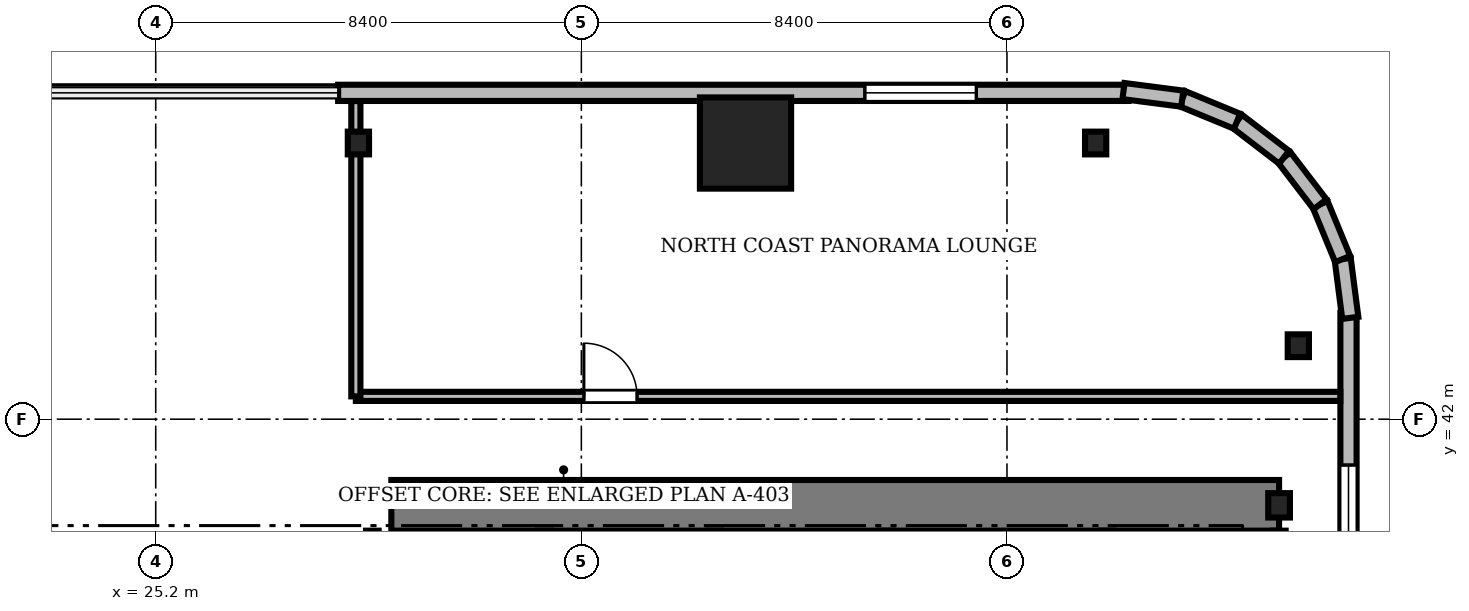
"""IFC4 building model, lengths in metres.
Left out: names, types, materials, properties, quantities, classifications, styles, units other than length and angle.
Written with IfcOpenShell. Run it as: python <this file> out.ifc"""

import sys

from ifc_helpers import new_model, si_unit, direction, frame, frame_2d, origin, origin_2d, place, context, subcontext, project, spatial, rectangle, i_section, extrude, source, transform, mapped, element, fill, save


model = new_model("IFC4")
c1 = context("Model", 3, precision=1e-05, world=origin(), true_north=direction((0.0, 1.0)))
c2 = subcontext(c1, "Body", "Model", "MODEL_VIEW")
j1 = project(units=[si_unit("LENGTHUNIT", "METRE"), si_unit("PLANEANGLEUNIT", "RADIAN")], contexts=[c1])
p1 = place(None, origin())
s1 = spatial("IfcSite", under=j1, at=p1, CompositionType="ELEMENT")
p2 = place(p1, origin())
s2 = spatial("IfcBuilding", under=s1, at=p2, CompositionType="ELEMENT")
p3 = place(p2, frame((0.0, 0.0, 67.75)))
s3 = spatial("IfcBuildingStorey", under=s2, at=p3, CompositionType="ELEMENT", Elevation=67.75)
m1 = source(origin(), c2, "Body", "SweptSolid", [
    extrude(rectangle(XDim=17.52, YDim=1.0, at=frame_2d((8.76, 0.0))), origin(), (0.0, 0.0, 1.0), 3.41),
])
p4 = place(p3, frame((29.85, 40.3, 0.0), z_axis=(0.0, 0.0, 1.0), x_axis=(1.0, 0.0, 0.0)))
e1 = element("IfcWall", 1, at=p4, inside=s3, PredefinedType="SHEAR", context=c2, shape_type="MappedRepresentation", body=[
    mapped(m1, transform((0.0, 0.0, 0.0), scale=1.0)),
])
m2 = source(origin(), c2, "Body", "SweptSolid", [
    extrude(i_section(OverallWidth=0.428, OverallDepth=0.481, WebThickness=0.04, FlangeThickness=0.063, FilletRadius=0.015, at=origin_2d()), origin(), (0.0, 0.0, 1.0), 3.41),
])
p5 = place(p3, frame((47.37, 40.3, 0.0), z_axis=(0.0, 0.0, 1.0), x_axis=(1.0, 0.0, 0.0)))
e2 = element("IfcColumn", 2, at=p5, inside=s3, PredefinedType="COLUMN", context=c2, shape_type="MappedRepresentation", body=[
    mapped(m2, transform((0.0, 0.0, 0.0), scale=1.0)),
])
m3 = source(origin(), c2, "Body", "SweptSolid", [
    extrude(rectangle(XDim=1.8, YDim=1.8, at=origin_2d()), origin(), (0.0, 0.0, 1.0), 3.41),
])
p6 = place(p3, frame((36.84, 47.45, 0.0), z_axis=(0.0, 0.0, 1.0), x_axis=(1.0, 0.0, 0.0)))
e3 = element("IfcColumn", 3, at=p6, inside=s3, PredefinedType="COLUMN", context=c2, shape_type="MappedRepresentation", body=[
    mapped(m3, transform((0.0, 0.0, 0.0), scale=1.0)),
])
m4 = source(origin(), c2, "Body", "SweptSolid", [
    extrude(i_section(OverallWidth=0.419, OverallDepth=0.449, WebThickness=0.031, FlangeThickness=0.048, FilletRadius=0.015, at=origin_2d()), origin(), (0.0, 0.0, 1.0), 3.41),
])
for number, where, z_axis, x_axis in (
    (4, (47.75, 43.45, 0.0), (0.0, 0.0, 1.0), (1.0, 0.0, 0.0)),
    (5, (43.75, 47.45, 0.0), (0.0, 0.0, 1.0), (1.0, 0.0, 0.0)),
    (6, (29.2, 47.45, 0.0), (0.0, 0.0, 1.0), (1.0, 0.0, 0.0)),
):
    element("IfcColumn", number, at=place(p3, frame(where, z_axis=z_axis, x_axis=x_axis)), inside=s3, PredefinedType="COLUMN", context=c2, shape_type="MappedRepresentation", body=[
        mapped(m4, transform((0.0, 0.0, 0.0), scale=1.0)),
    ])
m5 = source(origin(), c2, "Body", "SweptSolid", [
    extrude(rectangle(XDim=15.6, YDim=0.32, at=frame_2d((7.8, 0.0))), origin(), (0.0, 0.0, 1.0), 3.41),
])
p7 = place(p3, frame((44.4, 48.44, 0.0), z_axis=(0.0, 0.0, 1.0), x_axis=(-1.0, 0.0, 0.0)))
e7 = element("IfcWall", 7, at=p7, inside=s3, PredefinedType="SOLIDWALL", context=c2, shape_type="MappedRepresentation", body=[
    mapped(m5, transform((0.0, 0.0, 0.0), scale=1.0)),
])
m6 = source(origin(), c2, "Body", "SweptSolid", [
    extrude(rectangle(XDim=2.2, YDim=2.4, at=frame_2d((1.1, 1.2))), frame((0.0, 0.17, 0.0), z_axis=(0.0, -1.0, 0.0), x_axis=(1.0, 0.0, 0.0)), (0.0, 0.0, 1.0), 0.34),
])
p8 = place(p7, frame((3.005, 0.0, 0.72)))
e8 = element("IfcOpeningElement", 8, at=p8, cuts=e7, PredefinedType="OPENING", context=c2, shape_type="MappedRepresentation", body=[
    mapped(m6, transform((0.0, 0.0, 0.0), scale=1.0)),
])
m7 = source(origin(), c2, "Body", "SweptSolid", [
    extrude(rectangle(XDim=15.6, YDim=0.32, at=frame_2d((7.8, 0.0))), origin(), (0.0, 0.0, 1.0), 3.41),
])
p9 = place(p3, frame((48.74, 28.5, 0.0), z_axis=(0.0, 0.0, 1.0), x_axis=(0.0, 1.0, 0.0)))
e9 = element("IfcWall", 9, at=p9, inside=s3, PredefinedType="SOLIDWALL", context=c2, shape_type="MappedRepresentation", body=[
    mapped(m7, transform((0.0, 0.0, 0.0), scale=1.0)),
])
p10 = place(p9, frame((10.395, 0.0, 0.72)))
e10 = element("IfcOpeningElement", 10, at=p10, cuts=e9, PredefinedType="OPENING", context=c2, shape_type="MappedRepresentation", body=[
    mapped(m6, transform((0.0, 0.0, 0.0), scale=1.0)),
])
m8 = source(origin(), c2, "Body", "SweptSolid", [
    extrude(rectangle(XDim=1.17, YDim=0.32, at=frame_2d((0.585, 0.0))), origin(), (0.0, 0.0, 1.0), 3.41),
])
p11 = place(p3, frame((48.776, 44.0, 0.0), z_axis=(0.0, 0.0, 1.0), x_axis=(-0.128295670475, 0.991735963317, 0.0)))
e11 = element("IfcWall", 11, at=p11, inside=s3, PredefinedType="SOLIDWALL", context=c2, shape_type="MappedRepresentation", body=[
    mapped(m8, transform((0.0, 0.0, 0.0), scale=1.0)),
])
m9 = source(origin(), c2, "Body", "SweptSolid", [
    extrude(rectangle(XDim=1.169, YDim=0.32, at=frame_2d((0.584, 0.0))), origin(), (0.0, 0.0, 1.0), 3.41),
])
p12 = place(p3, frame((48.625, 45.16, 0.0), z_axis=(0.0, 0.0, 1.0), x_axis=(-0.381054331552, 0.924552646638, 0.0)))
e12 = element("IfcWall", 12, at=p12, inside=s3, PredefinedType="SOLIDWALL", context=c2, shape_type="MappedRepresentation", body=[
    mapped(m9, transform((0.0, 0.0, 0.0), scale=1.0)),
])
m10 = source(origin(), c2, "Body", "SweptSolid", [
    extrude(rectangle(XDim=1.169, YDim=0.32, at=frame_2d((0.584, 0.0))), origin(), (0.0, 0.0, 1.0), 3.41),
])
p13 = place(p3, frame((48.18, 46.241, 0.0), z_axis=(0.0, 0.0, 1.0), x_axis=(-0.608387696831, 0.793639975269, 0.0)))
e13 = element("IfcWall", 13, at=p13, inside=s3, PredefinedType="SOLIDWALL", context=c2, shape_type="MappedRepresentation", body=[
    mapped(m10, transform((0.0, 0.0, 0.0), scale=1.0)),
])
m11 = source(origin(), c2, "Body", "SweptSolid", [
    extrude(rectangle(XDim=1.169, YDim=0.32, at=frame_2d((0.584, 0.0))), origin(), (0.0, 0.0, 1.0), 3.41),
])
p14 = place(p3, frame((47.469, 47.169, 0.0), z_axis=(0.0, 0.0, 1.0), x_axis=(-0.793663520347, 0.608356981114, 0.0)))
e14 = element("IfcWall", 14, at=p14, inside=s3, PredefinedType="SOLIDWALL", context=c2, shape_type="MappedRepresentation", body=[
    mapped(m11, transform((0.0, 0.0, 0.0), scale=1.0)),
])
p15 = place(p3, frame((46.541, 47.88, 0.0), z_axis=(0.0, 0.0, 1.0), x_axis=(-0.924552646638, 0.381054331552, 0.0)))
e15 = element("IfcWall", 15, at=p15, inside=s3, PredefinedType="SOLIDWALL", context=c2, shape_type="MappedRepresentation", body=[
    mapped(m9, transform((0.0, 0.0, 0.0), scale=1.0)),
])
p16 = place(p3, frame((45.46, 48.325, 0.0), z_axis=(0.0, 0.0, 1.0), x_axis=(-0.991735963317, 0.128295670475, 0.0)))
e16 = element("IfcWall", 16, at=p16, inside=s3, PredefinedType="SOLIDWALL", context=c2, shape_type="MappedRepresentation", body=[
    mapped(m8, transform((0.0, 0.0, 0.0), scale=1.0)),
])
m12 = source(origin(), c2, "Body", "SweptSolid", [
    extrude(rectangle(XDim=9.15, YDim=0.25, at=frame_2d((4.575, 0.0))), origin(), (0.0, 0.0, 1.0), 3.45),
])
for number, where, z_axis, x_axis in (
    (17, (29.475, 30.65, 0.0), (0.0, 0.0, 1.0), (0.0, 1.0, 0.0)),
    (18, (32.875, 30.65, 0.0), (0.0, 0.0, 1.0), (0.0, 1.0, 0.0)),
    (19, (36.225, 30.65, 0.0), (0.0, 0.0, 1.0), (0.0, 1.0, 0.0)),
    (20, (39.625, 30.65, 0.0), (0.0, 0.0, 1.0), (0.0, 1.0, 0.0)),
    (21, (43.975, 30.65, 0.0), (0.0, 0.0, 1.0), (0.0, 1.0, 0.0)),
    (22, (47.375, 30.65, 0.0), (0.0, 0.0, 1.0), (0.0, 1.0, 0.0)),
):
    element("IfcWall", number, at=place(p3, frame(where, z_axis=z_axis, x_axis=x_axis)), inside=s3, PredefinedType="SOLIDWALL", context=c2, shape_type="MappedRepresentation", body=[
        mapped(m12, transform((0.0, 0.0, 0.0), scale=1.0)),
    ])
m13 = source(origin(), c2, "Body", "SweptSolid", [
    extrude(rectangle(XDim=19.428, YDim=0.18, at=frame_2d((9.714, 0.0))), origin(), (0.0, 0.0, 1.0), 2.652),
])
p17 = place(p3, frame((29.15, 42.45, 0.0), z_axis=(0.0, 0.0, 1.0), x_axis=(1.0, 0.0, 0.0)))
e23 = element("IfcWall", 23, at=p17, inside=s3, PredefinedType="PARTITIONING", context=c2, shape_type="MappedRepresentation", body=[
    mapped(m13, transform((0.0, 0.0, 0.0), scale=1.0)),
])
m14 = source(origin(), c2, "Body", "SweptSolid", [
    extrude(rectangle(XDim=1.05, YDim=2.2, at=frame_2d((0.525, 1.1))), frame((0.0, 0.1, 0.0), z_axis=(0.0, -1.0, 0.0), x_axis=(1.0, 0.0, 0.0)), (0.0, 0.0, 1.0), 0.2),
])
p18 = place(p17, frame((4.5, 0.0, 0.0)))
e24 = element("IfcOpeningElement", 24, at=p18, cuts=e23, PredefinedType="OPENING", context=c2, shape_type="MappedRepresentation", body=[
    mapped(m14, transform((0.0, 0.0, 0.0), scale=1.0)),
])
m15 = source(origin(), c2, "Body", "SweptSolid", [
    extrude(rectangle(XDim=5.828, YDim=0.18, at=frame_2d((2.914, 0.0))), origin(), (0.0, 0.0, 1.0), 2.652),
])
p19 = place(p3, frame((29.15, 42.45, 0.0), z_axis=(0.0, 0.0, 1.0), x_axis=(0.0, 1.0, 0.0)))
e25 = element("IfcWall", 25, at=p19, inside=s3, PredefinedType="PARTITIONING", context=c2, shape_type="MappedRepresentation", body=[
    mapped(m15, transform((0.0, 0.0, 0.0), scale=1.0)),
])
m16 = source(origin(), c2, "Body", "SweptSolid", [
    extrude(rectangle(XDim=2.2, YDim=2.4, at=frame_2d((1.1, 1.2))), frame((0.0, 0.03, 0.0), z_axis=(0.0, -1.0, 0.0), x_axis=(1.0, 0.0, 0.0)), (0.0, 0.0, 1.0), 0.06),
])
p20 = place(p8, origin())
e26 = element("IfcWindow", 26, at=p20, inside=s3, PartitioningType="SINGLE_PANEL", PredefinedType="WINDOW", context=c2, shape_type="MappedRepresentation", body=[
    mapped(m16, transform((0.0, 0.0, 0.0), scale=1.0)),
])
fill(e8, e26)
p21 = place(p10, origin())
e27 = element("IfcWindow", 27, at=p21, inside=s3, PartitioningType="SINGLE_PANEL", PredefinedType="WINDOW", context=c2, shape_type="MappedRepresentation", body=[
    mapped(m16, transform((0.0, 0.0, 0.0), scale=1.0)),
])
fill(e10, e27)
m17 = source(origin(), c2, "Body", "SweptSolid", [
    extrude(rectangle(XDim=1.05, YDim=2.2, at=frame_2d((0.525, 1.1))), frame((0.0, 0.025, 0.0), z_axis=(0.0, -1.0, 0.0), x_axis=(1.0, 0.0, 0.0)), (0.0, 0.0, 1.0), 0.05),
])
p22 = place(p18, origin())
e28 = element("IfcDoor", 28, at=p22, inside=s3, OperationType="SINGLE_SWING_LEFT", PredefinedType="DOOR", context=c2, shape_type="MappedRepresentation", body=[
    mapped(m17, transform((0.0, 0.0, 0.0), scale=1.0)),
])
fill(e24, e28)
save(model, sys.argv[1])
